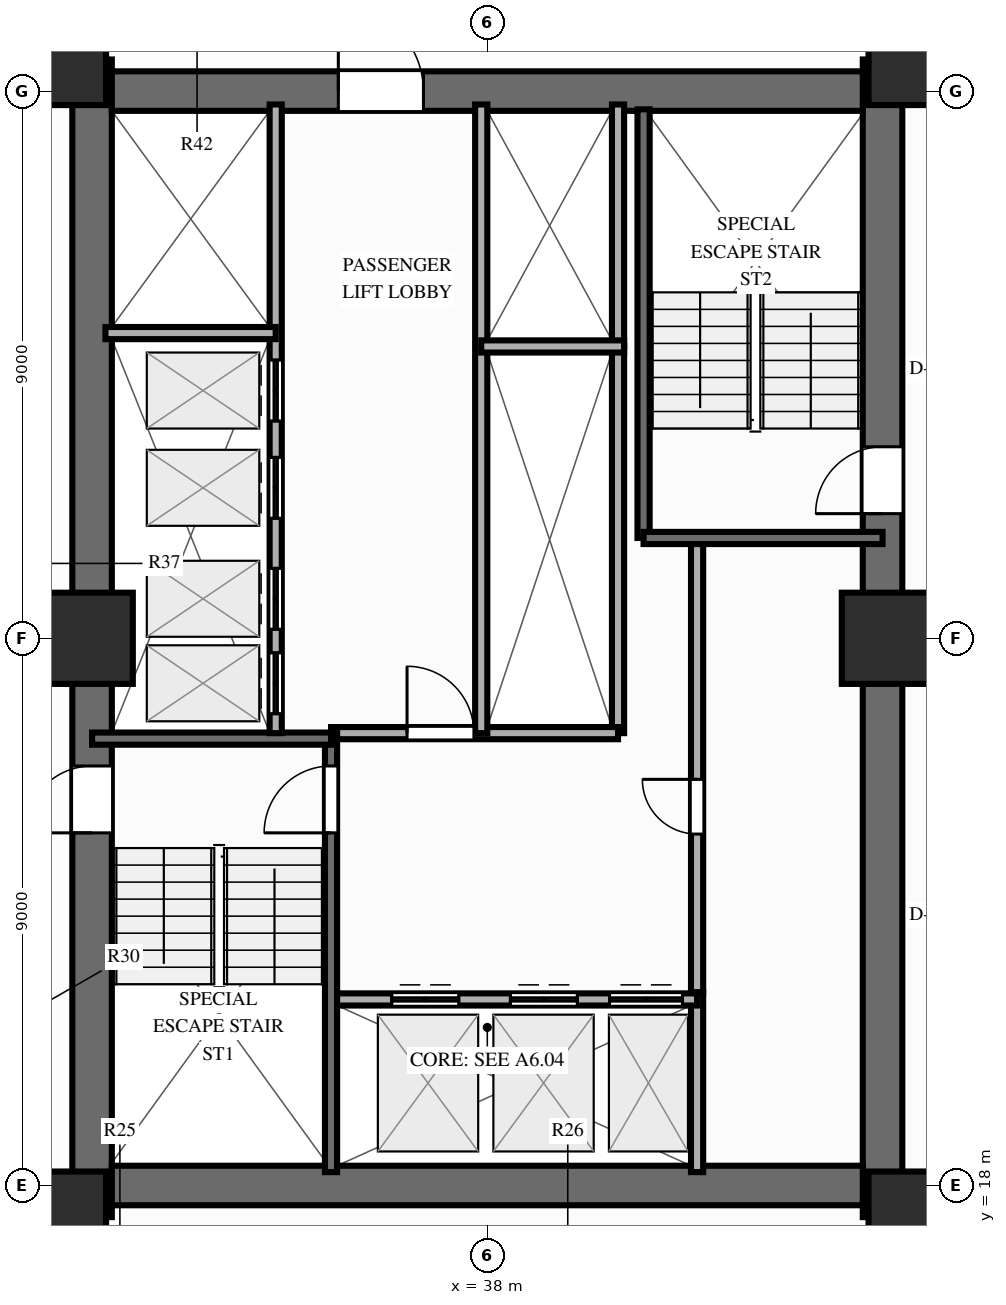
"""IFC4 building model, lengths in metres.
Left out: names, types, materials, properties, quantities, classifications, styles, units other than length and angle.
Written with IfcOpenShell. Run it as: python <this file> out.ifc"""

import sys

from ifc_helpers import new_model, si_unit, direction, frame, frame_2d, origin, origin_2d, place, context, subcontext, project, spatial, rectangle, extrude, source, transform, mapped, element, fill, save


model = new_model("IFC4")
c1 = context("Model", 3, precision=1e-05, world=origin(), true_north=direction((0.0, 1.0)))
c2 = subcontext(c1, "Body", "Model", "MODEL_VIEW")
j1 = project(units=[si_unit("LENGTHUNIT", "METRE"), si_unit("PLANEANGLEUNIT", "RADIAN")], contexts=[c1])
p1 = place(None, origin())
s1 = spatial("IfcSite", under=j1, at=p1, CompositionType="ELEMENT")
p2 = place(p1, origin())
s2 = spatial("IfcBuilding", under=s1, at=p2, CompositionType="ELEMENT")
p3 = place(p2, frame((0.0, 0.0, 25.4)))
s3 = spatial("IfcBuildingStorey", under=s2, at=p3, CompositionType="ELEMENT", Elevation=25.4)
p4 = place(p3, frame((31.5, 17.48, 0.0), z_axis=(0.0, 0.0, 1.0), x_axis=(0.0, 1.0, 0.0)))
e1 = element("IfcWall", 1, at=p4, inside=s3, PredefinedType="SHEAR", context=c2, shape_type="SweptSolid", body=[
    extrude(rectangle(XDim=19.04, YDim=0.65, at=frame_2d((9.52, 0.0))), origin(), (0.0, 0.0, 1.0), 3.0),
])
p5 = place(p4, frame((6.32, 0.0, 0.0)))
e2 = element("IfcOpeningElement", 2, at=p5, cuts=e1, PredefinedType="OPENING", context=c2, shape_type="SweptSolid", body=[
    extrude(rectangle(XDim=1.1, YDim=2.15, at=frame_2d((0.55, 1.075))), frame((0.0, 0.337, 0.0), z_axis=(0.0, -1.0, 0.0), x_axis=(1.0, 0.0, 0.0)), (0.0, 0.0, 1.0), 0.674),
])
p6 = place(p3, frame((44.5, 17.48, 0.0), z_axis=(0.0, 0.0, 1.0), x_axis=(0.0, 1.0, 0.0)))
e3 = element("IfcWall", 3, at=p6, inside=s3, PredefinedType="SHEAR", context=c2, shape_type="SweptSolid", body=[
    extrude(rectangle(XDim=19.04, YDim=0.65, at=frame_2d((9.52, 0.0))), origin(), (0.0, 0.0, 1.0), 3.0),
])
p7 = place(p6, frame((12.67, 0.0, 0.0), z_axis=(0.0, 0.0, 1.0), x_axis=(-1.0, 0.0, 0.0)))
e4 = element("IfcOpeningElement", 4, at=p7, cuts=e3, PredefinedType="OPENING", context=c2, shape_type="SweptSolid", body=[
    extrude(rectangle(XDim=1.1, YDim=2.15, at=frame_2d((0.55, 1.075))), frame((0.0, 0.337, 0.0), z_axis=(0.0, -1.0, 0.0), x_axis=(1.0, 0.0, 0.0)), (0.0, 0.0, 1.0), 0.674),
])
p8 = place(p3, frame((31.825, 18.0, 0.0), z_axis=(0.0, 0.0, 1.0), x_axis=(1.0, 0.0, 0.0)))
e5 = element("IfcWall", 5, at=p8, inside=s3, PredefinedType="SHEAR", context=c2, shape_type="SweptSolid", body=[
    extrude(rectangle(XDim=12.35, YDim=0.65, at=frame_2d((6.175, 0.0))), origin(), (0.0, 0.0, 1.0), 3.0),
])
p9 = place(p3, frame((31.825, 36.0, 0.0), z_axis=(0.0, 0.0, 1.0), x_axis=(1.0, 0.0, 0.0)))
e6 = element("IfcWall", 6, at=p9, inside=s3, PredefinedType="SHEAR", context=c2, shape_type="SweptSolid", body=[
    extrude(rectangle(XDim=12.35, YDim=0.65, at=frame_2d((6.175, 0.0))), origin(), (0.0, 0.0, 1.0), 3.0),
])
p10 = place(p9, frame((5.125, 0.0, 0.0), z_axis=(0.0, 0.0, 1.0), x_axis=(-1.0, 0.0, 0.0)))
e7 = element("IfcOpeningElement", 7, at=p10, cuts=e6, PredefinedType="OPENING", context=c2, shape_type="SweptSolid", body=[
    extrude(rectangle(XDim=1.4, YDim=2.15, at=frame_2d((0.7, 1.075))), frame((0.0, 0.337, 0.0), z_axis=(0.0, -1.0, 0.0), x_axis=(1.0, 0.0, 0.0)), (0.0, 0.0, 1.0), 0.674),
])
m1 = source(origin(), c2, "Body", "SweptSolid", [
    extrude(rectangle(XDim=1.5, YDim=1.5, at=origin_2d()), origin(), (0.0, 0.0, 1.0), 3.0),
])
for number, where, z_axis, x_axis in (
    (8, (30.98, 17.48, 0.0), (0.0, 0.0, 1.0), (1.0, 0.0, 0.0)),
    (9, (45.02, 17.48, 0.0), (0.0, 0.0, 1.0), (1.0, 0.0, 0.0)),
    (10, (30.98, 36.52, 0.0), (0.0, 0.0, 1.0), (1.0, 0.0, 0.0)),
    (11, (45.02, 36.52, 0.0), (0.0, 0.0, 1.0), (1.0, 0.0, 0.0)),
    (12, (31.42, 27.0, 0.0), (0.0, 0.0, 1.0), (1.0, 0.0, 0.0)),
    (13, (44.58, 27.0, 0.0), (0.0, 0.0, 1.0), (1.0, 0.0, 0.0)),
):
    element("IfcColumn", number, at=place(p3, frame(where, z_axis=z_axis, x_axis=x_axis)), inside=s3, PredefinedType="COLUMN", context=c2, shape_type="MappedRepresentation", body=[
        mapped(m1, transform((0.0, 0.0, 0.0), scale=1.0)),
    ])
p11 = place(p3, frame((41.45, 18.22, 0.0), z_axis=(0.0, 0.0, 1.0), x_axis=(0.0, 1.0, 0.0)))
e14 = element("IfcWall", 14, at=p11, inside=s3, PredefinedType="PARTITIONING", context=c2, shape_type="SweptSolid", body=[
    extrude(rectangle(XDim=2.96, YDim=0.2, at=frame_2d((1.48, 0.0))), origin(), (0.0, 0.0, 1.0), 2.79),
])
p12 = place(p3, frame((41.45, 21.18, 0.0), z_axis=(0.0, 0.0, 1.0), x_axis=(0.0, 1.0, 0.0)))
e15 = element("IfcWall", 15, at=p12, inside=s3, PredefinedType="PARTITIONING", context=c2, shape_type="SweptSolid", body=[
    extrude(rectangle(XDim=7.42, YDim=0.2, at=frame_2d((3.71, 0.0))), origin(), (0.0, 0.0, 1.0), 2.79),
])
p13 = place(p12, frame((2.6, 0.0, 0.0)))
e16 = element("IfcOpeningElement", 16, at=p13, cuts=e15, PredefinedType="OPENING", context=c2, shape_type="SweptSolid", body=[
    extrude(rectangle(XDim=0.9, YDim=2.1, at=frame_2d((0.45, 1.05))), frame((0.0, 0.112, 0.0), z_axis=(0.0, -1.0, 0.0), x_axis=(1.0, 0.0, 0.0)), (0.0, 0.0, 1.0), 0.224),
])
p14 = place(p3, frame((40.15, 25.44, 0.0), z_axis=(0.0, 0.0, 1.0), x_axis=(0.0, 1.0, 0.0)))
e17 = element("IfcWall", 17, at=p14, inside=s3, PredefinedType="PARTITIONING", context=c2, shape_type="SweptSolid", body=[
    extrude(rectangle(XDim=6.36, YDim=0.2, at=frame_2d((3.18, 0.0))), origin(), (0.0, 0.0, 1.0), 2.79),
])
p15 = place(p3, frame((40.15, 31.8, 0.0), z_axis=(0.0, 0.0, 1.0), x_axis=(0.0, 1.0, 0.0)))
e18 = element("IfcWall", 18, at=p15, inside=s3, PredefinedType="PARTITIONING", context=c2, shape_type="SweptSolid", body=[
    extrude(rectangle(XDim=3.98, YDim=0.2, at=frame_2d((1.99, 0.0))), origin(), (0.0, 0.0, 1.0), 2.79),
])
p16 = place(p3, frame((35.43, 21.06, 0.0), z_axis=(0.0, 0.0, 1.0), x_axis=(1.0, 0.0, 0.0)))
e19 = element("IfcWall", 19, at=p16, inside=s3, PredefinedType="PARTITIONING", context=c2, shape_type="SweptSolid", body=[
    extrude(rectangle(XDim=6.02, YDim=0.2, at=frame_2d((3.01, 0.0))), origin(), (0.0, 0.0, 1.0), 2.79),
])
p17 = place(p16, frame((1.0, 0.0, 0.0)))
e20 = element("IfcOpeningElement", 20, at=p17, cuts=e19, PredefinedType="OPENING", context=c2, shape_type="SweptSolid", body=[
    extrude(rectangle(XDim=1.1, YDim=2.15, at=frame_2d((0.55, 1.075))), frame((0.0, 0.112, 0.0), z_axis=(0.0, -1.0, 0.0), x_axis=(1.0, 0.0, 0.0)), (0.0, 0.0, 1.0), 0.224),
])
p18 = place(p16, frame((2.95, 0.0, 0.0)))
e21 = element("IfcOpeningElement", 21, at=p18, cuts=e19, PredefinedType="OPENING", context=c2, shape_type="SweptSolid", body=[
    extrude(rectangle(XDim=1.1, YDim=2.15, at=frame_2d((0.55, 1.075))), frame((0.0, 0.112, 0.0), z_axis=(0.0, -1.0, 0.0), x_axis=(1.0, 0.0, 0.0)), (0.0, 0.0, 1.0), 0.224),
])
p19 = place(p16, frame((4.58, 0.0, 0.0)))
e22 = element("IfcOpeningElement", 22, at=p19, cuts=e19, PredefinedType="OPENING", context=c2, shape_type="SweptSolid", body=[
    extrude(rectangle(XDim=1.2, YDim=2.15, at=frame_2d((0.6, 1.075))), frame((0.0, 0.112, 0.0), z_axis=(0.0, -1.0, 0.0), x_axis=(1.0, 0.0, 0.0)), (0.0, 0.0, 1.0), 0.224),
])
p20 = place(p3, frame((35.43, 25.44, 0.0), z_axis=(0.0, 0.0, 1.0), x_axis=(1.0, 0.0, 0.0)))
e23 = element("IfcWall", 23, at=p20, inside=s3, PredefinedType="PARTITIONING", context=c2, shape_type="SweptSolid", body=[
    extrude(rectangle(XDim=4.72, YDim=0.2, at=frame_2d((2.36, 0.0))), origin(), (0.0, 0.0, 1.0), 2.79),
])
p21 = place(p20, frame((1.25, 0.0, 0.0)))
e24 = element("IfcOpeningElement", 24, at=p21, cuts=e23, PredefinedType="OPENING", context=c2, shape_type="SweptSolid", body=[
    extrude(rectangle(XDim=1.1, YDim=2.15, at=frame_2d((0.55, 1.075))), frame((0.0, 0.112, 0.0), z_axis=(0.0, -1.0, 0.0), x_axis=(1.0, 0.0, 0.0)), (0.0, 0.0, 1.0), 0.224),
])
p22 = place(p3, frame((35.43, 18.22, 0.0), z_axis=(0.0, 0.0, 1.0), x_axis=(0.0, 1.0, 0.0)))
e25 = element("IfcWall", 25, at=p22, inside=s3, PredefinedType="SOLIDWALL", context=c2, shape_type="SweptSolid", body=[
    extrude(rectangle(XDim=7.22, YDim=0.2, at=frame_2d((3.61, 0.0))), origin(), (0.0, 0.0, 1.0), 2.79),
])
p23 = place(p22, frame((6.68, 0.0, 0.0), z_axis=(0.0, 0.0, 1.0), x_axis=(-1.0, 0.0, 0.0)))
e26 = element("IfcOpeningElement", 26, at=p23, cuts=e25, PredefinedType="OPENING", context=c2, shape_type="SweptSolid", body=[
    extrude(rectangle(XDim=1.1, YDim=2.15, at=frame_2d((0.55, 1.075))), frame((0.0, 0.112, 0.0), z_axis=(0.0, -1.0, 0.0), x_axis=(1.0, 0.0, 0.0)), (0.0, 0.0, 1.0), 0.224),
])
p24 = place(p3, frame((31.5, 25.35, 0.0), z_axis=(0.0, 0.0, 1.0), x_axis=(1.0, 0.0, 0.0)))
e27 = element("IfcWall", 27, at=p24, inside=s3, PredefinedType="SOLIDWALL", context=c2, shape_type="SweptSolid", body=[
    extrude(rectangle(XDim=3.93, YDim=0.2, at=frame_2d((1.965, 0.0))), origin(), (0.0, 0.0, 1.0), 2.79),
])
p25 = place(p3, frame((40.57, 28.65, 0.0), z_axis=(0.0, 0.0, 1.0), x_axis=(0.0, 1.0, 0.0)))
e28 = element("IfcWall", 28, at=p25, inside=s3, PredefinedType="SOLIDWALL", context=c2, shape_type="SweptSolid", body=[
    extrude(rectangle(XDim=7.05, YDim=0.2, at=frame_2d((3.525, 0.0))), origin(), (0.0, 0.0, 1.0), 2.79),
])
p26 = place(p3, frame((40.57, 28.65, 0.0), z_axis=(0.0, 0.0, 1.0), x_axis=(1.0, 0.0, 0.0)))
e29 = element("IfcWall", 29, at=p26, inside=s3, PredefinedType="SOLIDWALL", context=c2, shape_type="SweptSolid", body=[
    extrude(rectangle(XDim=3.93, YDim=0.2, at=frame_2d((1.965, 0.0))), origin(), (0.0, 0.0, 1.0), 2.79),
])
p27 = place(p3, frame((34.52, 25.44, 0.0), z_axis=(0.0, 0.0, 1.0), x_axis=(0.0, 1.0, 0.0)))
e30 = element("IfcWall", 30, at=p27, inside=s3, PredefinedType="PARTITIONING", context=c2, shape_type="SweptSolid", body=[
    extrude(rectangle(XDim=10.34, YDim=0.2, at=frame_2d((5.17, 0.0))), origin(), (0.0, 0.0, 1.0), 2.79),
])
p28 = place(p27, frame((0.32, 0.0, 0.0)))
e31 = element("IfcOpeningElement", 31, at=p28, cuts=e30, PredefinedType="OPENING", context=c2, shape_type="SweptSolid", body=[
    extrude(rectangle(XDim=1.0, YDim=2.15, at=frame_2d((0.5, 1.075))), frame((0.0, 0.112, 0.0), z_axis=(0.0, -1.0, 0.0), x_axis=(1.0, 0.0, 0.0)), (0.0, 0.0, 1.0), 0.224),
])
p29 = place(p27, frame((1.71, 0.0, 0.0)))
e32 = element("IfcOpeningElement", 32, at=p29, cuts=e30, PredefinedType="OPENING", context=c2, shape_type="SweptSolid", body=[
    extrude(rectangle(XDim=1.0, YDim=2.15, at=frame_2d((0.5, 1.075))), frame((0.0, 0.112, 0.0), z_axis=(0.0, -1.0, 0.0), x_axis=(1.0, 0.0, 0.0)), (0.0, 0.0, 1.0), 0.224),
])
p30 = place(p27, frame((3.535, 0.0, 0.0)))
e33 = element("IfcOpeningElement", 33, at=p30, cuts=e30, PredefinedType="OPENING", context=c2, shape_type="SweptSolid", body=[
    extrude(rectangle(XDim=1.0, YDim=2.15, at=frame_2d((0.5, 1.075))), frame((0.0, 0.112, 0.0), z_axis=(0.0, -1.0, 0.0), x_axis=(1.0, 0.0, 0.0)), (0.0, 0.0, 1.0), 0.224),
])
p31 = place(p27, frame((5.135, 0.0, 0.0)))
e34 = element("IfcOpeningElement", 34, at=p31, cuts=e30, PredefinedType="OPENING", context=c2, shape_type="SweptSolid", body=[
    extrude(rectangle(XDim=1.0, YDim=2.15, at=frame_2d((0.5, 1.075))), frame((0.0, 0.112, 0.0), z_axis=(0.0, -1.0, 0.0), x_axis=(1.0, 0.0, 0.0)), (0.0, 0.0, 1.0), 0.224),
])
p32 = place(p3, frame((31.72, 32.02, 0.0), z_axis=(0.0, 0.0, 1.0), x_axis=(1.0, 0.0, 0.0)))
e35 = element("IfcWall", 35, at=p32, inside=s3, PredefinedType="PARTITIONING", context=c2, shape_type="SweptSolid", body=[
    extrude(rectangle(XDim=2.8, YDim=0.2, at=frame_2d((1.4, 0.0))), origin(), (0.0, 0.0, 1.0), 2.79),
])
p33 = place(p3, frame((37.9, 25.44, 0.0), z_axis=(0.0, 0.0, 1.0), x_axis=(0.0, 1.0, 0.0)))
e36 = element("IfcWall", 36, at=p33, inside=s3, PredefinedType="PARTITIONING", context=c2, shape_type="SweptSolid", body=[
    extrude(rectangle(XDim=10.34, YDim=0.2, at=frame_2d((5.17, 0.0))), origin(), (0.0, 0.0, 1.0), 2.79),
])
p34 = place(p3, frame((37.9, 31.8, 0.0), z_axis=(0.0, 0.0, 1.0), x_axis=(1.0, 0.0, 0.0)))
e37 = element("IfcWall", 37, at=p34, inside=s3, PredefinedType="PARTITIONING", context=c2, shape_type="SweptSolid", body=[
    extrude(rectangle(XDim=2.35, YDim=0.2, at=frame_2d((1.175, 0.0))), origin(), (0.0, 0.0, 1.0), 2.79),
])
m2 = source(origin(), c2, "Body", "SweptSolid", [
    extrude(rectangle(XDim=1.1, YDim=2.15, at=frame_2d((0.55, 1.075))), frame((0.0, 0.025, 0.0), z_axis=(0.0, -1.0, 0.0), x_axis=(1.0, 0.0, 0.0)), (0.0, 0.0, 1.0), 0.05),
])
p35 = place(p5, origin())
e38 = element("IfcDoor", 38, at=p35, inside=s3, OperationType="SINGLE_SWING_LEFT", PredefinedType="DOOR", context=c2, shape_type="MappedRepresentation", body=[
    mapped(m2, transform((0.0, 0.0, 0.0), scale=1.0)),
])
fill(e2, e38)
p36 = place(p7, origin())
e39 = element("IfcDoor", 39, at=p36, inside=s3, OperationType="SINGLE_SWING_RIGHT", PredefinedType="DOOR", context=c2, shape_type="MappedRepresentation", body=[
    mapped(m2, transform((0.0, 0.0, 0.0), scale=1.0)),
])
fill(e4, e39)
m3 = source(origin(), c2, "Body", "SweptSolid", [
    extrude(rectangle(XDim=1.4, YDim=2.15, at=frame_2d((0.7, 1.075))), frame((0.0, 0.025, 0.0), z_axis=(0.0, -1.0, 0.0), x_axis=(1.0, 0.0, 0.0)), (0.0, 0.0, 1.0), 0.05),
])
p37 = place(p10, origin())
e40 = element("IfcDoor", 40, at=p37, inside=s3, OperationType="SINGLE_SWING_RIGHT", PredefinedType="DOOR", context=c2, shape_type="MappedRepresentation", body=[
    mapped(m3, transform((0.0, 0.0, 0.0), scale=1.0)),
])
fill(e7, e40)
m4 = source(origin(), c2, "Body", "SweptSolid", [
    extrude(rectangle(XDim=0.9, YDim=2.1, at=frame_2d((0.45, 1.05))), frame((0.0, 0.025, 0.0), z_axis=(0.0, -1.0, 0.0), x_axis=(1.0, 0.0, 0.0)), (0.0, 0.0, 1.0), 0.05),
])
p38 = place(p13, origin())
e41 = element("IfcDoor", 41, at=p38, inside=s3, OperationType="SINGLE_SWING_RIGHT", PredefinedType="DOOR", context=c2, shape_type="MappedRepresentation", body=[
    mapped(m4, transform((0.0, 0.0, 0.0), scale=1.0)),
])
fill(e16, e41)
p39 = place(p17, origin())
e42 = element("IfcDoor", 42, at=p39, inside=s3, OperationType="DOUBLE_DOOR_SLIDING", PredefinedType="DOOR", context=c2, shape_type="MappedRepresentation", body=[
    mapped(m2, transform((0.0, 0.0, 0.0), scale=1.0)),
])
fill(e20, e42)
p40 = place(p18, origin())
e43 = element("IfcDoor", 43, at=p40, inside=s3, OperationType="DOUBLE_DOOR_SLIDING", PredefinedType="DOOR", context=c2, shape_type="MappedRepresentation", body=[
    mapped(m2, transform((0.0, 0.0, 0.0), scale=1.0)),
])
fill(e21, e43)
m5 = source(origin(), c2, "Body", "SweptSolid", [
    extrude(rectangle(XDim=1.2, YDim=2.15, at=frame_2d((0.6, 1.075))), frame((0.0, 0.025, 0.0), z_axis=(0.0, -1.0, 0.0), x_axis=(1.0, 0.0, 0.0)), (0.0, 0.0, 1.0), 0.05),
])
p41 = place(p19, origin())
e44 = element("IfcDoor", 44, at=p41, inside=s3, OperationType="DOUBLE_DOOR_SLIDING", PredefinedType="DOOR", context=c2, shape_type="MappedRepresentation", body=[
    mapped(m5, transform((0.0, 0.0, 0.0), scale=1.0)),
])
fill(e22, e44)
p42 = place(p21, origin())
e45 = element("IfcDoor", 45, at=p42, inside=s3, OperationType="SINGLE_SWING_LEFT", PredefinedType="DOOR", context=c2, shape_type="MappedRepresentation", body=[
    mapped(m2, transform((0.0, 0.0, 0.0), scale=1.0)),
])
fill(e24, e45)
p43 = place(p23, origin())
e46 = element("IfcDoor", 46, at=p43, inside=s3, OperationType="SINGLE_SWING_RIGHT", PredefinedType="DOOR", context=c2, shape_type="MappedRepresentation", body=[
    mapped(m2, transform((0.0, 0.0, 0.0), scale=1.0)),
])
fill(e26, e46)
m6 = source(origin(), c2, "Body", "SweptSolid", [
    extrude(rectangle(XDim=1.0, YDim=2.15, at=frame_2d((0.5, 1.075))), frame((0.0, 0.025, 0.0), z_axis=(0.0, -1.0, 0.0), x_axis=(1.0, 0.0, 0.0)), (0.0, 0.0, 1.0), 0.05),
])
p44 = place(p28, origin())
e47 = element("IfcDoor", 47, at=p44, inside=s3, OperationType="DOUBLE_DOOR_SLIDING", PredefinedType="DOOR", context=c2, shape_type="MappedRepresentation", body=[
    mapped(m6, transform((0.0, 0.0, 0.0), scale=1.0)),
])
fill(e31, e47)
p45 = place(p29, origin())
e48 = element("IfcDoor", 48, at=p45, inside=s3, OperationType="DOUBLE_DOOR_SLIDING", PredefinedType="DOOR", context=c2, shape_type="MappedRepresentation", body=[
    mapped(m6, transform((0.0, 0.0, 0.0), scale=1.0)),
])
fill(e32, e48)
p46 = place(p30, origin())
e49 = element("IfcDoor", 49, at=p46, inside=s3, OperationType="DOUBLE_DOOR_SLIDING", PredefinedType="DOOR", context=c2, shape_type="MappedRepresentation", body=[
    mapped(m6, transform((0.0, 0.0, 0.0), scale=1.0)),
])
fill(e33, e49)
p47 = place(p31, origin())
e50 = element("IfcDoor", 50, at=p47, inside=s3, OperationType="DOUBLE_DOOR_SLIDING", PredefinedType="DOOR", context=c2, shape_type="MappedRepresentation", body=[
    mapped(m6, transform((0.0, 0.0, 0.0), scale=1.0)),
])
fill(e34, e50)
save(model, sys.argv[1])
